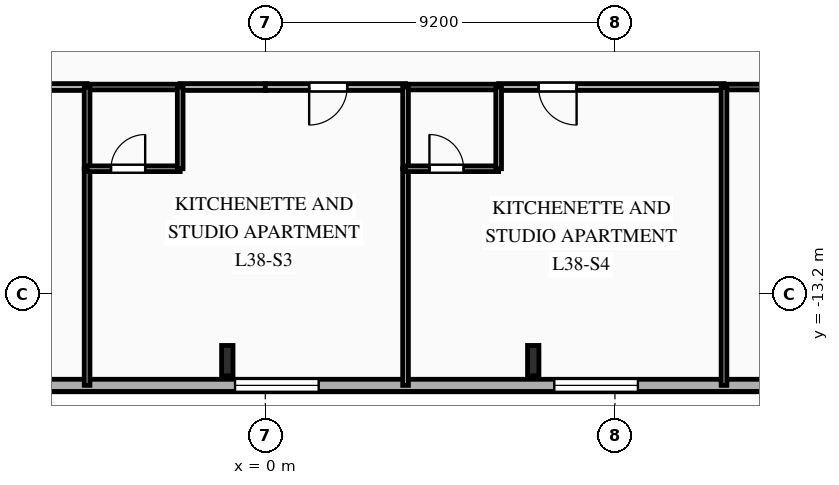
"""IFC4 building model, lengths in metres.
Left out: names, types, materials, properties, quantities, classifications, styles, units other than length and angle.
Written with IfcOpenShell. Run it as: python <this file> out.ifc"""

import sys

from ifc_helpers import new_model, si_unit, direction, frame, frame_2d, origin, origin_2d, place, context, subcontext, project, spatial, rectangle, i_section, extrude, element, fill, save


model = new_model("IFC4")
c1 = context("Model", 3, precision=1e-05, world=origin(), true_north=direction((0.0, 1.0)))
c2 = subcontext(c1, "Body", "Model", "MODEL_VIEW")
j1 = project(units=[si_unit("LENGTHUNIT", "METRE"), si_unit("PLANEANGLEUNIT", "RADIAN")], contexts=[c1])
p1 = place(None, origin())
s1 = spatial("IfcSite", under=j1, at=p1, CompositionType="ELEMENT")
p2 = place(p1, origin())
s2 = spatial("IfcBuilding", under=s1, at=p2, CompositionType="ELEMENT")
p3 = place(p2, frame((0.0, 0.0, 137.7)))
s3 = spatial("IfcBuildingStorey", under=s2, at=p3, CompositionType="ELEMENT", Elevation=137.7)
for number, where, z_axis, x_axis in (
    (1, (-1.0, -14.95, 0.0), (0.0, 0.0, 1.0), (1.0, 0.0, 0.0)),
    (2, (7.05, -14.95, 0.0), (0.0, 0.0, 1.0), (1.0, 0.0, 0.0)),
):
    element("IfcColumn", number, at=place(p3, frame(where, z_axis=z_axis, x_axis=x_axis)), inside=s3, PredefinedType="COLUMN", context=c2, shape_type="SweptSolid", body=[
        extrude(i_section(OverallWidth=0.3, OverallDepth=0.8, WebThickness=0.018, FlangeThickness=0.033, FilletRadius=0.03, at=origin_2d()), origin(), (0.0, 0.0, 1.0), 3.35),
    ])
p4 = place(p3, frame((23.8, -15.6, 0.0), z_axis=(0.0, 0.0, 1.0), x_axis=(-1.0, 0.0, 0.0)))
e3 = element("IfcWall", 3, at=p4, inside=s3, PredefinedType="SOLIDWALL", context=c2, shape_type="SweptSolid", body=[
    extrude(rectangle(XDim=49.6, YDim=0.32, at=frame_2d((24.8, 0.0))), origin(), (0.0, 0.0, 1.0), 3.04),
])
p5 = place(p4, frame((1.13, 0.0, 0.85)))
e4 = element("IfcOpeningElement", 4, at=p5, cuts=e3, PredefinedType="OPENING", context=c2, shape_type="SweptSolid", body=[
    extrude(rectangle(XDim=1.1, YDim=1.85, at=frame_2d((0.55, 0.925))), frame((0.0, 0.17, 0.0), z_axis=(0.0, -1.0, 0.0), x_axis=(1.0, 0.0, 0.0)), (0.0, 0.0, 1.0), 0.34),
])
p6 = place(p4, frame((6.495, 0.0, 0.85)))
e5 = element("IfcOpeningElement", 5, at=p6, cuts=e3, PredefinedType="OPENING", context=c2, shape_type="SweptSolid", body=[
    extrude(rectangle(XDim=1.65, YDim=1.85, at=frame_2d((0.825, 0.925))), frame((0.0, 0.17, 0.0), z_axis=(0.0, -1.0, 0.0), x_axis=(1.0, 0.0, 0.0)), (0.0, 0.0, 1.0), 0.34),
])
p7 = place(p4, frame((13.996, 0.0, 0.85)))
e6 = element("IfcOpeningElement", 6, at=p7, cuts=e3, PredefinedType="OPENING", context=c2, shape_type="SweptSolid", body=[
    extrude(rectangle(XDim=2.2, YDim=1.85, at=frame_2d((1.1, 0.925))), frame((0.0, 0.17, 0.0), z_axis=(0.0, -1.0, 0.0), x_axis=(1.0, 0.0, 0.0)), (0.0, 0.0, 1.0), 0.34),
])
p8 = place(p4, frame((22.396, 0.0, 0.85)))
e7 = element("IfcOpeningElement", 7, at=p8, cuts=e3, PredefinedType="OPENING", context=c2, shape_type="SweptSolid", body=[
    extrude(rectangle(XDim=2.2, YDim=1.85, at=frame_2d((1.1, 0.925))), frame((0.0, 0.17, 0.0), z_axis=(0.0, -1.0, 0.0), x_axis=(1.0, 0.0, 0.0)), (0.0, 0.0, 1.0), 0.34),
])
p9 = place(p4, frame((30.2, 0.0, 0.85)))
e8 = element("IfcOpeningElement", 8, at=p9, cuts=e3, PredefinedType="OPENING", context=c2, shape_type="SweptSolid", body=[
    extrude(rectangle(XDim=2.2, YDim=1.85, at=frame_2d((1.1, 0.925))), frame((0.0, 0.17, 0.0), z_axis=(0.0, -1.0, 0.0), x_axis=(1.0, 0.0, 0.0)), (0.0, 0.0, 1.0), 0.34),
])
p10 = place(p4, frame((38.673, 0.0, 0.85)))
e9 = element("IfcOpeningElement", 9, at=p10, cuts=e3, PredefinedType="OPENING", context=c2, shape_type="SweptSolid", body=[
    extrude(rectangle(XDim=1.65, YDim=1.85, at=frame_2d((0.825, 0.925))), frame((0.0, 0.17, 0.0), z_axis=(0.0, -1.0, 0.0), x_axis=(1.0, 0.0, 0.0)), (0.0, 0.0, 1.0), 0.34),
])
p11 = place(p4, frame((46.175, 0.0, 0.85)))
e10 = element("IfcOpeningElement", 10, at=p11, cuts=e3, PredefinedType="OPENING", context=c2, shape_type="SweptSolid", body=[
    extrude(rectangle(XDim=1.65, YDim=1.85, at=frame_2d((0.825, 0.925))), frame((0.0, 0.17, 0.0), z_axis=(0.0, -1.0, 0.0), x_axis=(1.0, 0.0, 0.0)), (0.0, 0.0, 1.0), 0.34),
])
p12 = place(p3, frame((-4.69, -7.75, 0.0), z_axis=(0.0, 0.0, 1.0), x_axis=(-1.0, 0.0, 0.0)))
e11 = element("IfcWall", 11, at=p12, inside=s3, PredefinedType="PARTITIONING", context=c2, shape_type="SweptSolid", body=[
    extrude(rectangle(XDim=5.93, YDim=0.18, at=frame_2d((2.965, 0.0))), origin(), (0.0, 0.0, 1.0), 3.04),
])
p13 = place(p12, frame((1.051, 0.0, 0.0)))
e12 = element("IfcOpeningElement", 12, at=p13, cuts=e11, PredefinedType="OPENING", context=c2, shape_type="SweptSolid", body=[
    extrude(rectangle(XDim=1.0, YDim=2.15, at=frame_2d((0.5, 1.075))), frame((0.0, 0.1, 0.0), z_axis=(0.0, -1.0, 0.0), x_axis=(1.0, 0.0, 0.0)), (0.0, 0.0, 1.0), 0.2),
])
p14 = place(p3, frame((0.0, -7.75, 0.0), z_axis=(0.0, 0.0, 1.0), x_axis=(-1.0, 0.0, 0.0)))
e13 = element("IfcWall", 13, at=p14, inside=s3, PredefinedType="PARTITIONING", context=c2, shape_type="SweptSolid", body=[
    extrude(rectangle(XDim=2.24, YDim=0.18, at=frame_2d((1.12, 0.0))), origin(), (0.0, 0.0, 1.0), 3.04),
])
p15 = place(p3, frame((-2.24, -7.75, 0.0), z_axis=(0.0, 0.0, 1.0), x_axis=(-1.0, 0.0, 0.0)))
e14 = element("IfcWall", 14, at=p15, inside=s3, PredefinedType="PLUMBINGWALL", context=c2, shape_type="SweptSolid", body=[
    extrude(rectangle(XDim=2.45, YDim=0.15, at=frame_2d((1.225, 0.0))), origin(), (0.0, 0.0, 1.0), 3.04),
])
p16 = place(p3, frame((3.69, -7.75, 0.0), z_axis=(0.0, 0.0, 1.0), x_axis=(-1.0, 0.0, 0.0)))
e15 = element("IfcWall", 15, at=p16, inside=s3, PredefinedType="PARTITIONING", context=c2, shape_type="SweptSolid", body=[
    extrude(rectangle(XDim=3.69, YDim=0.18, at=frame_2d((1.845, 0.0))), origin(), (0.0, 0.0, 1.0), 3.04),
])
p17 = place(p16, frame((1.536, 0.0, 0.0)))
e16 = element("IfcOpeningElement", 16, at=p17, cuts=e15, PredefinedType="OPENING", context=c2, shape_type="SweptSolid", body=[
    extrude(rectangle(XDim=1.0, YDim=2.15, at=frame_2d((0.5, 1.075))), frame((0.0, 0.1, 0.0), z_axis=(0.0, -1.0, 0.0), x_axis=(1.0, 0.0, 0.0)), (0.0, 0.0, 1.0), 0.2),
])
p18 = place(p3, frame((12.07, -7.75, 0.0), z_axis=(0.0, 0.0, 1.0), x_axis=(-1.0, 0.0, 0.0)))
e17 = element("IfcWall", 17, at=p18, inside=s3, PredefinedType="PARTITIONING", context=c2, shape_type="SweptSolid", body=[
    extrude(rectangle(XDim=5.93, YDim=0.18, at=frame_2d((2.965, 0.0))), origin(), (0.0, 0.0, 1.0), 3.04),
])
p19 = place(p18, frame((3.879, 0.0, 0.0)))
e18 = element("IfcOpeningElement", 18, at=p19, cuts=e17, PredefinedType="OPENING", context=c2, shape_type="SweptSolid", body=[
    extrude(rectangle(XDim=1.0, YDim=2.15, at=frame_2d((0.5, 1.075))), frame((0.0, 0.1, 0.0), z_axis=(0.0, -1.0, 0.0), x_axis=(1.0, 0.0, 0.0)), (0.0, 0.0, 1.0), 0.2),
])
p20 = place(p3, frame((6.14, -7.75, 0.0), z_axis=(0.0, 0.0, 1.0), x_axis=(-1.0, 0.0, 0.0)))
e19 = element("IfcWall", 19, at=p20, inside=s3, PredefinedType="PLUMBINGWALL", context=c2, shape_type="SweptSolid", body=[
    extrude(rectangle(XDim=2.45, YDim=0.15, at=frame_2d((1.225, 0.0))), origin(), (0.0, 0.0, 1.0), 3.04),
])
p21 = place(p3, frame((20.95, -7.75, 0.0), z_axis=(0.0, 0.0, 1.0), x_axis=(-1.0, 0.0, 0.0)))
e20 = element("IfcWall", 20, at=p21, inside=s3, PredefinedType="PARTITIONING", context=c2, shape_type="SweptSolid", body=[
    extrude(rectangle(XDim=8.88, YDim=0.15, at=frame_2d((4.44, 0.0))), origin(), (0.0, 0.0, 1.0), 3.04),
])
p22 = place(p21, frame((6.416, 0.0, 0.0)))
e21 = element("IfcOpeningElement", 21, at=p22, cuts=e20, PredefinedType="OPENING", context=c2, shape_type="SweptSolid", body=[
    extrude(rectangle(XDim=1.05, YDim=2.15, at=frame_2d((0.525, 1.075))), frame((0.0, 0.085, 0.0), z_axis=(0.0, -1.0, 0.0), x_axis=(1.0, 0.0, 0.0)), (0.0, 0.0, 1.0), 0.17),
])
p23 = place(p3, frame((-4.69, -9.9, 0.0), z_axis=(0.0, 0.0, 1.0), x_axis=(0.0, -1.0, 0.0)))
e22 = element("IfcWall", 22, at=p23, inside=s3, PredefinedType="PARTITIONING", context=c2, shape_type="SweptSolid", body=[
    extrude(rectangle(XDim=5.7, YDim=0.15, at=frame_2d((2.85, 0.0))), origin(), (0.0, 0.0, 1.0), 3.04),
])
p24 = place(p3, frame((-4.69, -7.75, 0.0), z_axis=(0.0, 0.0, 1.0), x_axis=(0.0, -1.0, 0.0)))
e23 = element("IfcWall", 23, at=p24, inside=s3, PredefinedType="PLUMBINGWALL", context=c2, shape_type="SweptSolid", body=[
    extrude(rectangle(XDim=2.15, YDim=0.15, at=frame_2d((1.075, 0.0))), origin(), (0.0, 0.0, 1.0), 3.04),
])
p25 = place(p3, frame((-4.69, -9.9, 0.0), z_axis=(0.0, 0.0, 1.0), x_axis=(1.0, 0.0, 0.0)))
e24 = element("IfcWall", 24, at=p25, inside=s3, PredefinedType="PLUMBINGWALL", context=c2, shape_type="SweptSolid", body=[
    extrude(rectangle(XDim=2.45, YDim=0.15, at=frame_2d((1.225, 0.0))), origin(), (0.0, 0.0, 1.0), 3.04),
])
p26 = place(p25, frame((0.629, 0.0, 0.0)))
e25 = element("IfcOpeningElement", 25, at=p26, cuts=e24, PredefinedType="OPENING", context=c2, shape_type="SweptSolid", body=[
    extrude(rectangle(XDim=0.9, YDim=2.1, at=frame_2d((0.45, 1.05))), frame((0.0, 0.085, 0.0), z_axis=(0.0, -1.0, 0.0), x_axis=(1.0, 0.0, 0.0)), (0.0, 0.0, 1.0), 0.17),
])
p27 = place(p3, frame((-2.24, -9.9, 0.0), z_axis=(0.0, 0.0, 1.0), x_axis=(0.0, 1.0, 0.0)))
e26 = element("IfcWall", 26, at=p27, inside=s3, PredefinedType="PLUMBINGWALL", context=c2, shape_type="SweptSolid", body=[
    extrude(rectangle(XDim=2.15, YDim=0.15, at=frame_2d((1.075, 0.0))), origin(), (0.0, 0.0, 1.0), 3.04),
])
p28 = place(p3, frame((3.69, -9.9, 0.0), z_axis=(0.0, 0.0, 1.0), x_axis=(0.0, -1.0, 0.0)))
e27 = element("IfcWall", 27, at=p28, inside=s3, PredefinedType="PARTITIONING", context=c2, shape_type="SweptSolid", body=[
    extrude(rectangle(XDim=5.7, YDim=0.15, at=frame_2d((2.85, 0.0))), origin(), (0.0, 0.0, 1.0), 3.04),
])
p29 = place(p3, frame((3.69, -7.75, 0.0), z_axis=(0.0, 0.0, 1.0), x_axis=(0.0, -1.0, 0.0)))
e28 = element("IfcWall", 28, at=p29, inside=s3, PredefinedType="PLUMBINGWALL", context=c2, shape_type="SweptSolid", body=[
    extrude(rectangle(XDim=2.15, YDim=0.15, at=frame_2d((1.075, 0.0))), origin(), (0.0, 0.0, 1.0), 3.04),
])
p30 = place(p3, frame((3.69, -9.9, 0.0), z_axis=(0.0, 0.0, 1.0), x_axis=(1.0, 0.0, 0.0)))
e29 = element("IfcWall", 29, at=p30, inside=s3, PredefinedType="PLUMBINGWALL", context=c2, shape_type="SweptSolid", body=[
    extrude(rectangle(XDim=2.45, YDim=0.15, at=frame_2d((1.225, 0.0))), origin(), (0.0, 0.0, 1.0), 3.04),
])
p31 = place(p30, frame((0.629, 0.0, 0.0)))
e30 = element("IfcOpeningElement", 30, at=p31, cuts=e29, PredefinedType="OPENING", context=c2, shape_type="SweptSolid", body=[
    extrude(rectangle(XDim=0.9, YDim=2.1, at=frame_2d((0.45, 1.05))), frame((0.0, 0.085, 0.0), z_axis=(0.0, -1.0, 0.0), x_axis=(1.0, 0.0, 0.0)), (0.0, 0.0, 1.0), 0.17),
])
p32 = place(p3, frame((6.14, -9.9, 0.0), z_axis=(0.0, 0.0, 1.0), x_axis=(0.0, 1.0, 0.0)))
e31 = element("IfcWall", 31, at=p32, inside=s3, PredefinedType="PLUMBINGWALL", context=c2, shape_type="SweptSolid", body=[
    extrude(rectangle(XDim=2.15, YDim=0.15, at=frame_2d((1.075, 0.0))), origin(), (0.0, 0.0, 1.0), 3.04),
])
p33 = place(p3, frame((12.07, -7.75, 0.0), z_axis=(0.0, 0.0, 1.0), x_axis=(0.0, -1.0, 0.0)))
e32 = element("IfcWall", 32, at=p33, inside=s3, PredefinedType="PARTITIONING", context=c2, shape_type="SweptSolid", body=[
    extrude(rectangle(XDim=7.85, YDim=0.15, at=frame_2d((3.925, 0.0))), origin(), (0.0, 0.0, 1.0), 3.04),
])
p34 = place(p7, origin())
e33 = element("IfcWindow", 33, at=p34, inside=s3, PartitioningType="SINGLE_PANEL", PredefinedType="WINDOW", context=c2, shape_type="SweptSolid", body=[
    extrude(rectangle(XDim=2.2, YDim=1.85, at=frame_2d((1.1, 0.925))), frame((0.0, 0.03, 0.0), z_axis=(0.0, -1.0, 0.0), x_axis=(1.0, 0.0, 0.0)), (0.0, 0.0, 1.0), 0.06),
])
fill(e6, e33)
p35 = place(p8, origin())
e34 = element("IfcWindow", 34, at=p35, inside=s3, PartitioningType="SINGLE_PANEL", PredefinedType="WINDOW", context=c2, shape_type="SweptSolid", body=[
    extrude(rectangle(XDim=2.2, YDim=1.85, at=frame_2d((1.1, 0.925))), frame((0.0, 0.03, 0.0), z_axis=(0.0, -1.0, 0.0), x_axis=(1.0, 0.0, 0.0)), (0.0, 0.0, 1.0), 0.06),
])
fill(e7, e34)
p36 = place(p17, origin())
e35 = element("IfcDoor", 35, at=p36, inside=s3, OperationType="SINGLE_SWING_RIGHT", PredefinedType="DOOR", context=c2, shape_type="SweptSolid", body=[
    extrude(rectangle(XDim=1.0, YDim=2.15, at=frame_2d((0.5, 1.075))), frame((0.0, 0.025, 0.0), z_axis=(0.0, -1.0, 0.0), x_axis=(1.0, 0.0, 0.0)), (0.0, 0.0, 1.0), 0.05),
])
fill(e16, e35)
p37 = place(p19, origin())
e36 = element("IfcDoor", 36, at=p37, inside=s3, OperationType="SINGLE_SWING_LEFT", PredefinedType="DOOR", context=c2, shape_type="SweptSolid", body=[
    extrude(rectangle(XDim=1.0, YDim=2.15, at=frame_2d((0.5, 1.075))), frame((0.0, 0.025, 0.0), z_axis=(0.0, -1.0, 0.0), x_axis=(1.0, 0.0, 0.0)), (0.0, 0.0, 1.0), 0.05),
])
fill(e18, e36)
p38 = place(p26, origin())
e37 = element("IfcDoor", 37, at=p38, inside=s3, OperationType="SINGLE_SWING_RIGHT", PredefinedType="DOOR", context=c2, shape_type="SweptSolid", body=[
    extrude(rectangle(XDim=0.9, YDim=2.1, at=frame_2d((0.45, 1.05))), frame((0.0, 0.025, 0.0), z_axis=(0.0, -1.0, 0.0), x_axis=(1.0, 0.0, 0.0)), (0.0, 0.0, 1.0), 0.05),
])
fill(e25, e37)
p39 = place(p31, origin())
e38 = element("IfcDoor", 38, at=p39, inside=s3, OperationType="SINGLE_SWING_LEFT", PredefinedType="DOOR", context=c2, shape_type="SweptSolid", body=[
    extrude(rectangle(XDim=0.9, YDim=2.1, at=frame_2d((0.45, 1.05))), frame((0.0, 0.025, 0.0), z_axis=(0.0, -1.0, 0.0), x_axis=(1.0, 0.0, 0.0)), (0.0, 0.0, 1.0), 0.05),
])
fill(e30, e38)
save(model, sys.argv[1])
